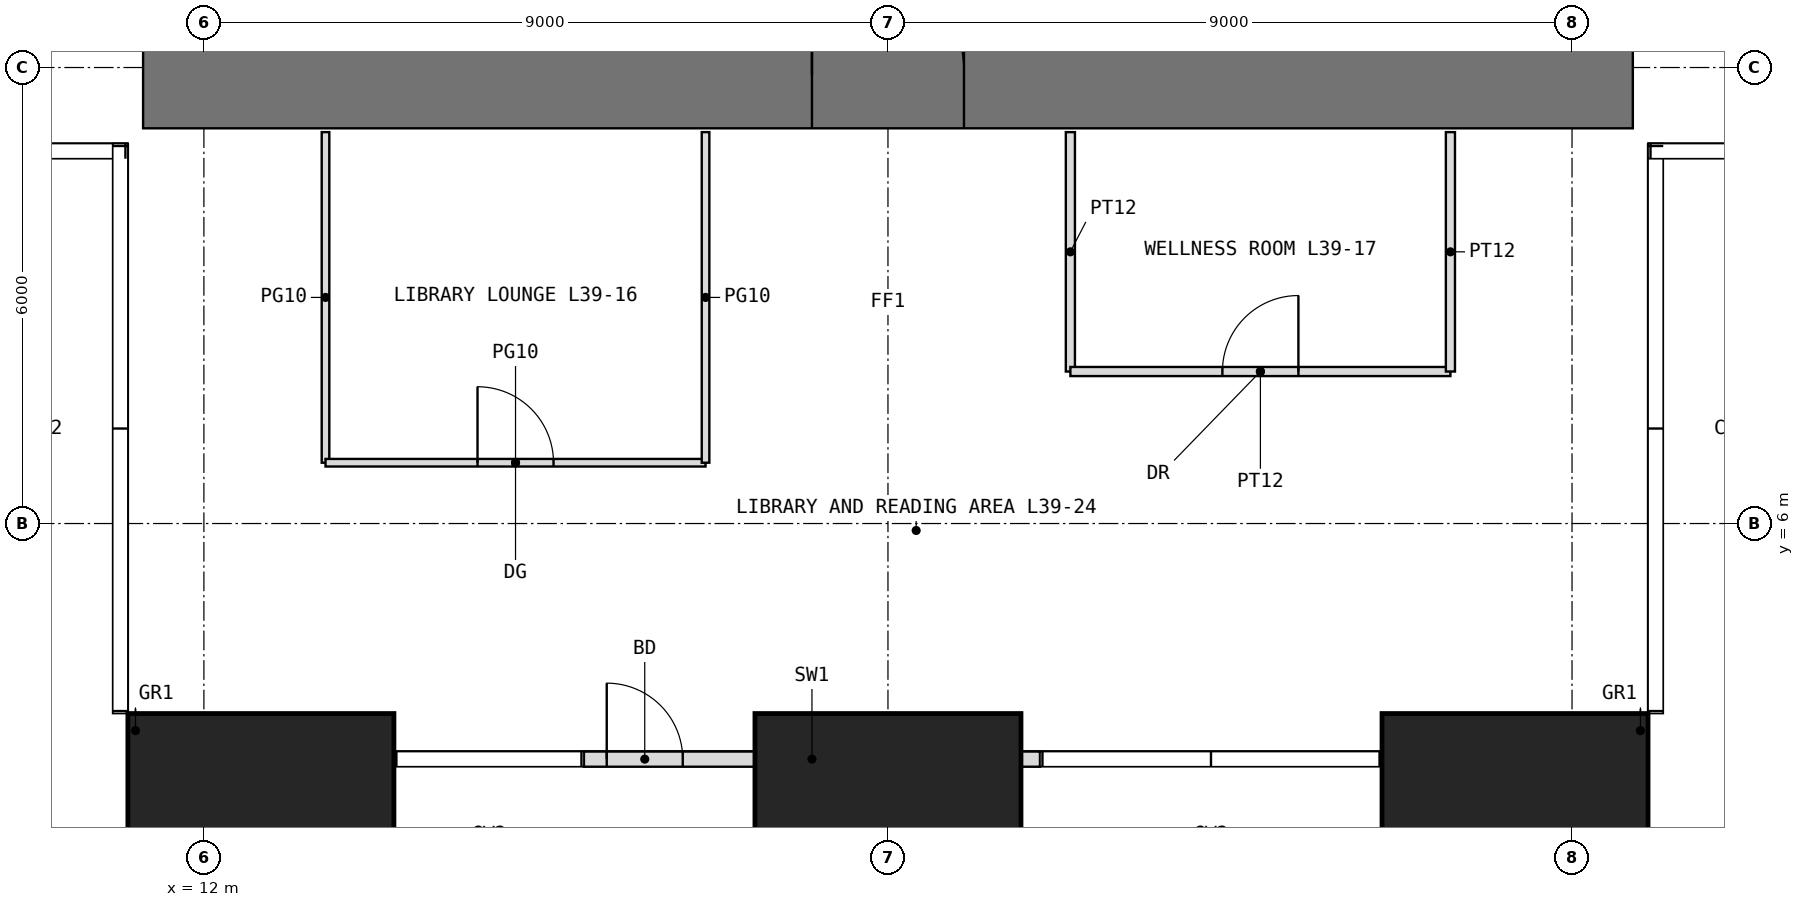
"""IFC4 building model, lengths in metres.
Left out: names, types, materials, properties, quantities, classifications, styles, units other than length and angle.
Written with IfcOpenShell. Run it as: python <this file> out.ifc"""

import sys

from ifc_helpers import new_model, si_unit, direction, frame, frame_2d, origin, origin_2d, place, context, subcontext, project, spatial, rectangle, extrude, element, fill, save


model = new_model("IFC4")
c1 = context("Model", 3, precision=1e-05, world=origin(), true_north=direction((0.0, 1.0)))
c2 = subcontext(c1, "Body", "Model", "MODEL_VIEW")
j1 = project(units=[si_unit("LENGTHUNIT", "METRE"), si_unit("PLANEANGLEUNIT", "RADIAN")], contexts=[c1])
p1 = place(None, origin())
s1 = spatial("IfcSite", under=j1, at=p1, CompositionType="ELEMENT")
p2 = place(p1, origin())
s2 = spatial("IfcBuilding", under=s1, at=p2, CompositionType="ELEMENT")
p3 = place(p2, frame((0.0, 0.0, 165.5)))
s3 = spatial("IfcBuildingStorey", under=s2, at=p3, CompositionType="ELEMENT", Elevation=165.5)
for number, where, z_axis, x_axis in (
    (1, (12.75, 1.75, 0.0), (0.0, 0.0, 1.0), (1.0, 0.0, 0.0)),
    (2, (21.0, 1.75, 0.0), (0.0, 0.0, 1.0), (1.0, 0.0, 0.0)),
    (3, (29.25, 1.75, 0.0), (0.0, 0.0, 1.0), (1.0, 0.0, 0.0)),
):
    element("IfcColumn", number, at=place(p3, frame(where, z_axis=z_axis, x_axis=x_axis)), inside=s3, PredefinedType="COLUMN", context=c2, shape_type="SweptSolid", body=[
        extrude(rectangle(XDim=3.5, YDim=3.5, at=origin_2d()), origin(), (0.0, 0.0, 1.0), 5.0),
    ])
p4 = place(p3, frame((17.0, 2.9, 0.0), z_axis=(0.0, 0.0, 1.0), x_axis=(1.0, 0.0, 0.0)))
e4 = element("IfcWall", 4, at=p4, inside=s3, PredefinedType="USERDEFINED", context=c2, shape_type="SweptSolid", body=[
    extrude(rectangle(XDim=6.0, YDim=0.2, at=frame_2d((3.0, 0.0))), origin(), (0.0, 0.0, 1.0), 4.75),
])
p5 = place(p4, frame((0.3, 0.0, 0.0)))
e5 = element("IfcOpeningElement", 5, at=p5, cuts=e4, PredefinedType="OPENING", context=c2, shape_type="SweptSolid", body=[
    extrude(rectangle(XDim=1.0, YDim=2.4, at=frame_2d((0.5, 1.2))), frame((0.0, 0.11, 0.0), z_axis=(0.0, -1.0, 0.0), x_axis=(1.0, 0.0, 0.0)), (0.0, 0.0, 1.0), 0.22),
])
p6 = place(p3, frame((11.2, 11.9, -0.05), z_axis=(0.0, 0.0, 1.0), x_axis=(1.0, 0.0, 0.0)))
e6 = element("IfcWall", 6, at=p6, inside=s3, PredefinedType="SHEAR", context=c2, shape_type="SweptSolid", body=[
    extrude(rectangle(XDim=19.6, YDim=1.4, at=frame_2d((9.8, 0.0))), origin(), (0.0, 0.0, 1.0), 5.0),
])
p7 = place(p6, frame((8.8, 0.0, 0.05)))
e7 = element("IfcOpeningElement", 7, at=p7, cuts=e6, PredefinedType="OPENING", context=c2, shape_type="SweptSolid", body=[
    extrude(rectangle(XDim=2.0, YDim=2.2, at=frame_2d((1.0, 1.1))), frame((0.0, 0.71, 0.0), z_axis=(0.0, -1.0, 0.0), x_axis=(1.0, 0.0, 0.0)), (0.0, 0.0, 1.0), 1.42),
])
p8 = place(p3, frame((13.6, 6.8, 0.0), z_axis=(0.0, 0.0, 1.0), x_axis=(0.0, 1.0, 0.0)))
e8 = element("IfcWall", 8, at=p8, inside=s3, PredefinedType="PARTITIONING", context=c2, shape_type="SweptSolid", body=[
    extrude(rectangle(XDim=4.35, YDim=0.1, at=frame_2d((2.175, 0.0))), origin(), (0.0, 0.0, 1.0), 4.75),
])
p9 = place(p3, frame((13.6, 6.8, 0.0), z_axis=(0.0, 0.0, 1.0), x_axis=(1.0, 0.0, 0.0)))
e9 = element("IfcWall", 9, at=p9, inside=s3, PredefinedType="PARTITIONING", context=c2, shape_type="SweptSolid", body=[
    extrude(rectangle(XDim=5.0, YDim=0.1, at=frame_2d((2.5, 0.0))), origin(), (0.0, 0.0, 1.0), 4.75),
])
p10 = place(p9, frame((2.0, 0.0, 0.0)))
e10 = element("IfcOpeningElement", 10, at=p10, cuts=e9, PredefinedType="OPENING", context=c2, shape_type="SweptSolid", body=[
    extrude(rectangle(XDim=1.0, YDim=2.4, at=frame_2d((0.5, 1.2))), frame((0.0, 0.06, 0.0), z_axis=(0.0, -1.0, 0.0), x_axis=(1.0, 0.0, 0.0)), (0.0, 0.0, 1.0), 0.12),
])
p11 = place(p3, frame((18.6, 6.8, 0.0), z_axis=(0.0, 0.0, 1.0), x_axis=(0.0, 1.0, 0.0)))
e11 = element("IfcWall", 11, at=p11, inside=s3, PredefinedType="PARTITIONING", context=c2, shape_type="SweptSolid", body=[
    extrude(rectangle(XDim=4.35, YDim=0.1, at=frame_2d((2.175, 0.0))), origin(), (0.0, 0.0, 1.0), 4.75),
])
p12 = place(p3, frame((23.4, 8.0, 0.0), z_axis=(0.0, 0.0, 1.0), x_axis=(0.0, 1.0, 0.0)))
e12 = element("IfcWall", 12, at=p12, inside=s3, PredefinedType="PARTITIONING", context=c2, shape_type="SweptSolid", body=[
    extrude(rectangle(XDim=3.15, YDim=0.12, at=frame_2d((1.575, 0.0))), origin(), (0.0, 0.0, 1.0), 4.75),
])
p13 = place(p3, frame((23.4, 8.0, 0.0), z_axis=(0.0, 0.0, 1.0), x_axis=(1.0, 0.0, 0.0)))
e13 = element("IfcWall", 13, at=p13, inside=s3, PredefinedType="PARTITIONING", context=c2, shape_type="SweptSolid", body=[
    extrude(rectangle(XDim=5.0, YDim=0.12, at=frame_2d((2.5, 0.0))), origin(), (0.0, 0.0, 1.0), 4.75),
])
p14 = place(p13, frame((2.0, 0.0, 0.0)))
e14 = element("IfcOpeningElement", 14, at=p14, cuts=e13, PredefinedType="OPENING", context=c2, shape_type="SweptSolid", body=[
    extrude(rectangle(XDim=1.0, YDim=2.2, at=frame_2d((0.5, 1.1))), frame((0.0, 0.07, 0.0), z_axis=(0.0, -1.0, 0.0), x_axis=(1.0, 0.0, 0.0)), (0.0, 0.0, 1.0), 0.14),
])
p15 = place(p3, frame((28.4, 8.0, 0.0), z_axis=(0.0, 0.0, 1.0), x_axis=(0.0, 1.0, 0.0)))
e15 = element("IfcWall", 15, at=p15, inside=s3, PredefinedType="PARTITIONING", context=c2, shape_type="SweptSolid", body=[
    extrude(rectangle(XDim=3.15, YDim=0.12, at=frame_2d((1.575, 0.0))), origin(), (0.0, 0.0, 1.0), 4.75),
])
p16 = place(p5, origin())
e16 = element("IfcDoor", 16, at=p16, inside=s3, OperationType="SINGLE_SWING_LEFT", PredefinedType="DOOR", context=c2, shape_type="SweptSolid", body=[
    extrude(rectangle(XDim=1.0, YDim=2.4, at=frame_2d((0.5, 1.2))), frame((0.0, 0.025, 0.0), z_axis=(0.0, -1.0, 0.0), x_axis=(1.0, 0.0, 0.0)), (0.0, 0.0, 1.0), 0.05),
])
fill(e5, e16)
p17 = place(p7, origin())
e17 = element("IfcDoor", 17, at=p17, inside=s3, OperationType="DOUBLE_DOOR_SINGLE_SWING", PredefinedType="DOOR", context=c2, shape_type="SweptSolid", body=[
    extrude(rectangle(XDim=2.0, YDim=2.2, at=frame_2d((1.0, 1.1))), frame((0.0, 0.025, 0.0), z_axis=(0.0, -1.0, 0.0), x_axis=(1.0, 0.0, 0.0)), (0.0, 0.0, 1.0), 0.05),
])
fill(e7, e17)
p18 = place(p10, origin())
e18 = element("IfcDoor", 18, at=p18, inside=s3, OperationType="SINGLE_SWING_LEFT", PredefinedType="DOOR", context=c2, shape_type="SweptSolid", body=[
    extrude(rectangle(XDim=1.0, YDim=2.4, at=frame_2d((0.5, 1.2))), frame((0.0, 0.025, 0.0), z_axis=(0.0, -1.0, 0.0), x_axis=(1.0, 0.0, 0.0)), (0.0, 0.0, 1.0), 0.05),
])
fill(e10, e18)
p19 = place(p14, origin())
e19 = element("IfcDoor", 19, at=p19, inside=s3, OperationType="SINGLE_SWING_RIGHT", PredefinedType="DOOR", context=c2, shape_type="SweptSolid", body=[
    extrude(rectangle(XDim=1.0, YDim=2.2, at=frame_2d((0.5, 1.1))), frame((0.0, 0.025, 0.0), z_axis=(0.0, -1.0, 0.0), x_axis=(1.0, 0.0, 0.0)), (0.0, 0.0, 1.0), 0.05),
])
fill(e14, e19)
save(model, sys.argv[1])
